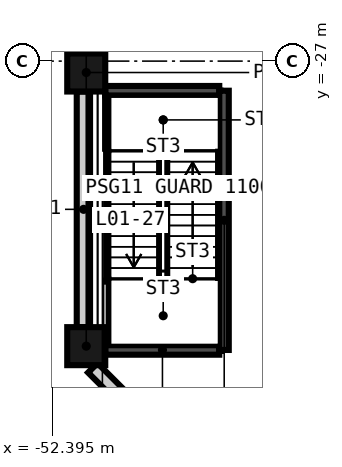
"""IFC4 building model, lengths in metres.
Left out: names, types, materials, properties, quantities, classifications, styles, units other than length and angle.
Written with IfcOpenShell. Run it as: python <this file> out.ifc"""

import sys

from ifc_helpers import new_model, si_unit, direction, frame, frame_2d, origin, origin_2d, place, context, subcontext, project, spatial, rectangle, extrude, element, save


model = new_model("IFC4")
c1 = context("Model", 3, precision=1e-05, world=origin(), true_north=direction((0.0, 1.0)))
c2 = subcontext(c1, "Body", "Model", "MODEL_VIEW")
j1 = project(units=[si_unit("LENGTHUNIT", "METRE"), si_unit("PLANEANGLEUNIT", "RADIAN")], contexts=[c1])
p1 = place(None, origin())
s1 = spatial("IfcSite", under=j1, at=p1, CompositionType="ELEMENT")
p2 = place(p1, origin())
s2 = spatial("IfcBuilding", under=s1, at=p2, CompositionType="ELEMENT")
p3 = place(p2, frame((0.0, 0.0, 9.0)))
s3 = spatial("IfcBuildingStorey", under=s2, at=p3, CompositionType="ELEMENT", Elevation=9.0)
for number, where, z_axis, x_axis in (
    (1, (-51.5, -34.5, -0.4), (0.0, 0.0, 1.0), (0.0, -1.0, 0.0)),
    (2, (-51.5, -27.3, -0.4), (0.0, 0.0, 1.0), (0.0, 1.0, 0.0)),
):
    element("IfcColumn", number, at=place(p3, frame(where, z_axis=z_axis, x_axis=x_axis)), inside=s3, PredefinedType="COLUMN", context=c2, shape_type="SweptSolid", body=[
        extrude(rectangle(XDim=1.0, YDim=1.0, at=origin_2d()), origin(), (0.0, 0.0, 1.0), 9.0),
    ])
p4 = place(p3, frame((-51.575, -27.8, -0.4), z_axis=(0.0, 0.0, 1.0), x_axis=(0.0, -1.0, 0.0)))
e3 = element("IfcWall", 3, at=p4, inside=s3, PredefinedType="SOLIDWALL", context=c2, shape_type="SweptSolid", body=[
    extrude(rectangle(XDim=6.2, YDim=0.35, at=frame_2d((3.1, 0.0))), origin(), (0.0, 0.0, 1.0), 8.1),
])
p5 = place(p3, frame((-51.327, -35.072, -0.4), z_axis=(0.0, 0.0, 1.0), x_axis=(0.707106781187, -0.707106781187, 0.0)))
e4 = element("IfcWall", 4, at=p5, inside=s3, PredefinedType="SOLIDWALL", context=c2, shape_type="SweptSolid", body=[
    extrude(rectangle(XDim=7.433, YDim=0.35, at=frame_2d((3.716, 0.0))), origin(), (0.0, 0.0, 1.0), 8.1),
])
for number, where, z_axis, x_axis in (
    (5, (-51.0, -34.6, 0.0), (0.0, 0.0, 1.0), (1.0, 0.0, 0.0)),
    (6, (-51.0, -27.779, 0.0), (0.0, 0.0, 1.0), (1.0, 0.0, 0.0)),
):
    element("IfcWall", number, at=place(p3, frame(where, z_axis=z_axis, x_axis=x_axis)), inside=s3, PredefinedType="SHEAR", context=c2, shape_type="SweptSolid", body=[
        extrude(rectangle(XDim=3.0, YDim=0.25, at=frame_2d((1.5, 0.0))), origin(), (0.0, 0.0, 1.0), 8.6),
    ])
p6 = place(p3, frame((-47.875, -34.6, 0.0), z_axis=(0.0, 0.0, 1.0), x_axis=(0.0, 1.0, 0.0)))
e7 = element("IfcWall", 7, at=p6, inside=s3, PredefinedType="SHEAR", context=c2, shape_type="SweptSolid", body=[
    extrude(rectangle(XDim=6.821, YDim=0.25, at=frame_2d((3.411, 0.0))), origin(), (0.0, 0.0, 1.0), 8.6),
])
save(model, sys.argv[1])
